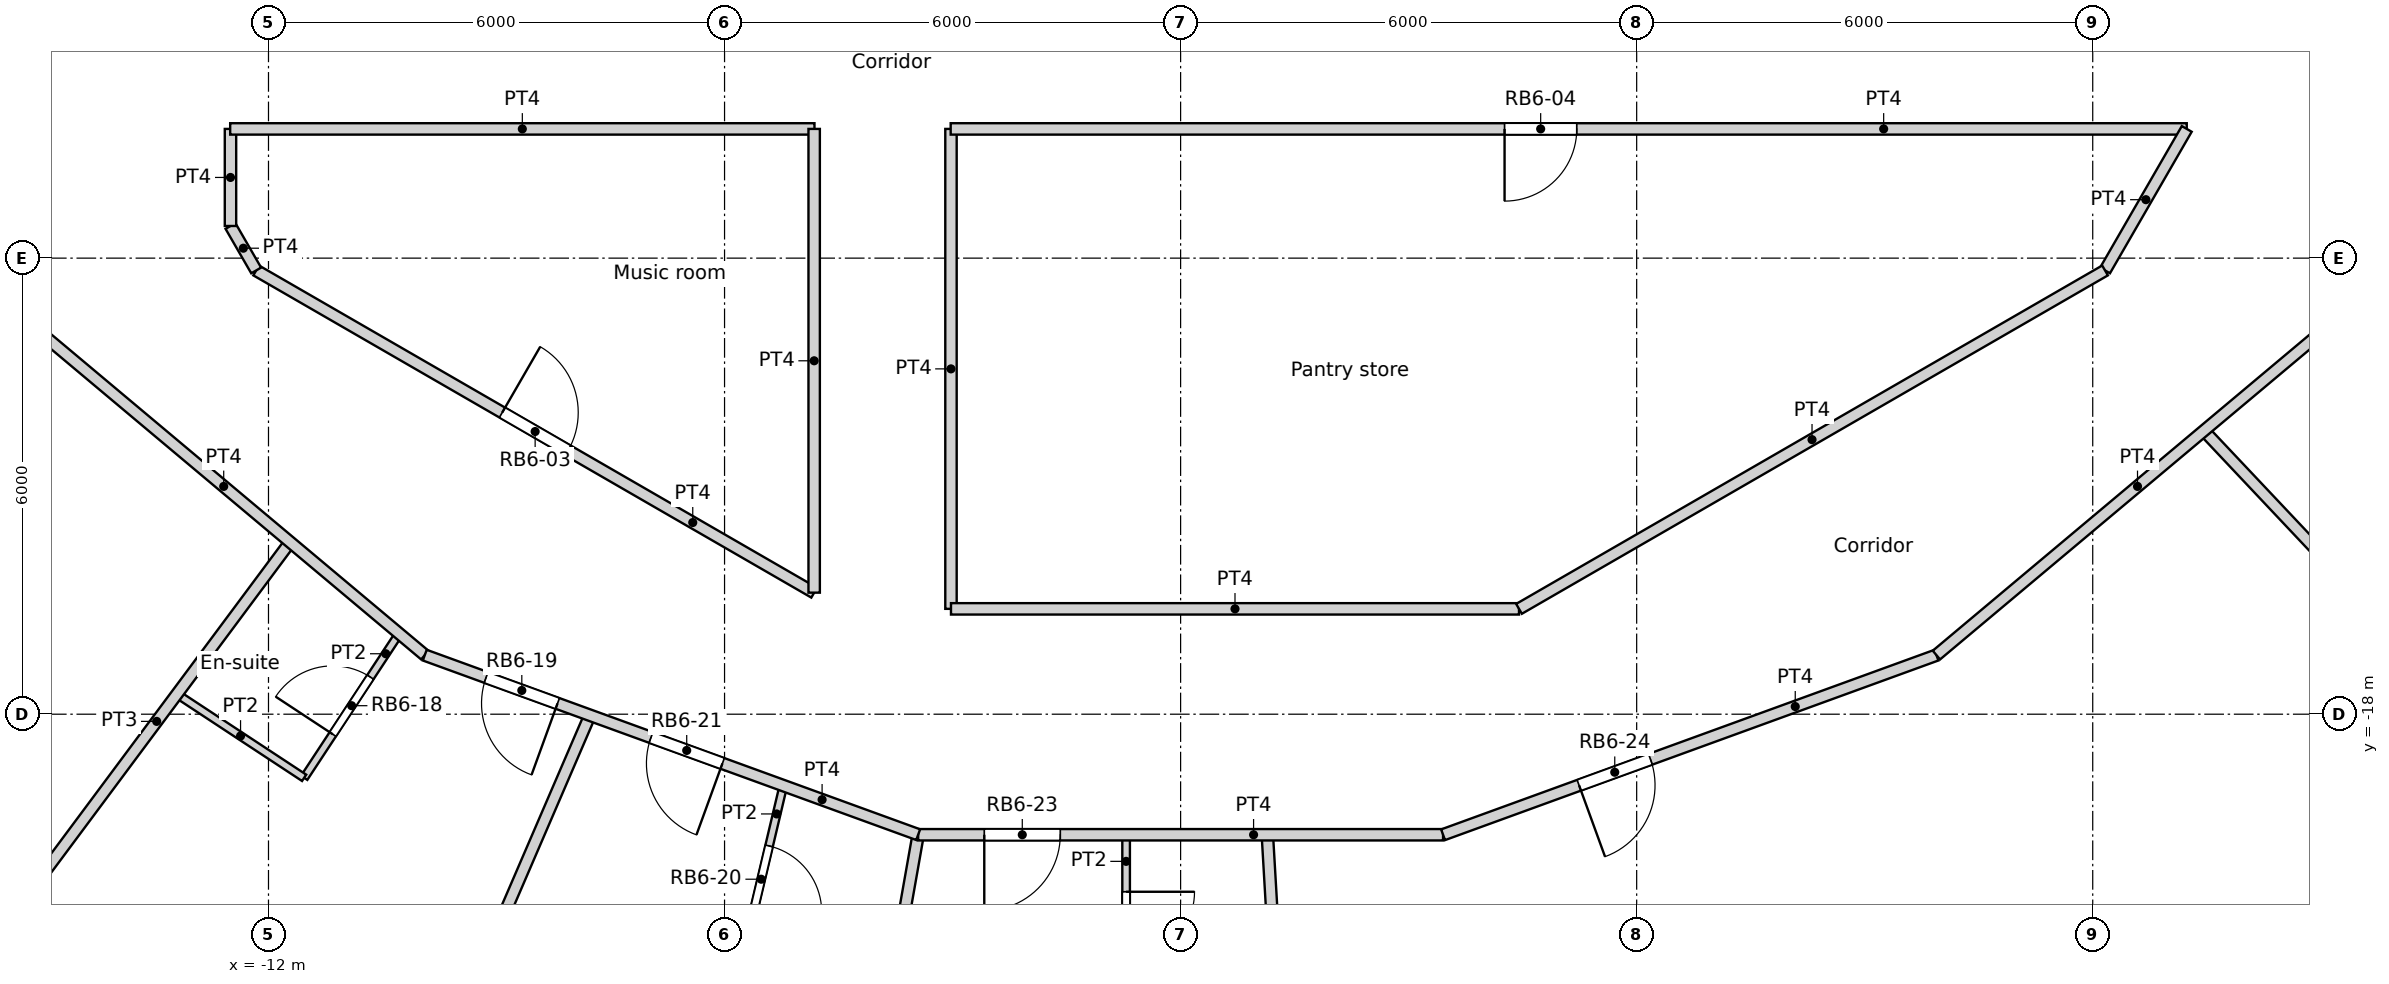
"""IFC4 building model, lengths in metres.
Left out: names, types, materials, properties, quantities, classifications, styles, units other than length and angle.
Written with IfcOpenShell. Run it as: python <this file> out.ifc"""

import sys

from ifc_helpers import new_model, si_unit, direction, frame, frame_2d, origin, origin_2d, place, context, subcontext, project, spatial, rectangle, circle, extrude, element, fill, save


model = new_model("IFC4")
c1 = context("Model", 3, precision=1e-05, world=origin(), true_north=direction((0.0, 1.0)))
c2 = subcontext(c1, "Body", "Model", "MODEL_VIEW")
j1 = project(units=[si_unit("LENGTHUNIT", "METRE"), si_unit("PLANEANGLEUNIT", "RADIAN")], contexts=[c1])
p1 = place(None, origin())
s1 = spatial("IfcSite", under=j1, at=p1, CompositionType="ELEMENT")
p2 = place(p1, origin())
s2 = spatial("IfcBuilding", under=s1, at=p2, CompositionType="ELEMENT")
p3 = place(p2, frame((0.0, 0.0, 180.0)))
s3 = spatial("IfcBuildingStorey", under=s2, at=p3, CompositionType="ELEMENT", Elevation=180.0)
p4 = place(p3, frame((14.659, -19.69, 0.0), z_axis=(0.0, 0.0, 1.0), x_axis=(1.0, 0.0, 0.0)))
e1 = element("IfcColumn", 1, at=p4, inside=s3, PredefinedType="COLUMN", context=c2, shape_type="SweptSolid", body=[
    extrude(circle(Radius=0.6, at=origin_2d()), origin(), (0.0, 0.0, 1.0), 3.6),
])
for number, where, z_axis, x_axis in (
    (2, (-13.798, -12.802, 0.0), (0.0, 0.0, 1.0), (1.0, 0.0, 0.0)),
    (3, (-9.411, -16.301, 0.0), (0.0, 0.0, 1.0), (1.0, 0.0, 0.0)),
    (4, (-4.188, -18.35, 0.0), (0.0, 0.0, 1.0), (1.0, 0.0, 0.0)),
    (5, (1.406, -18.77, 0.0), (0.0, 0.0, 1.0), (1.0, 0.0, 0.0)),
    (6, (6.876, -17.521, 0.0), (0.0, 0.0, 1.0), (1.0, 0.0, 0.0)),
    (7, (11.735, -14.716, 0.0), (0.0, 0.0, 1.0), (1.0, 0.0, 0.0)),
):
    element("IfcColumn", number, at=place(p3, frame(where, z_axis=z_axis, x_axis=x_axis)), inside=s3, PredefinedType="COLUMN", context=c2, shape_type="SweptSolid", body=[
        extrude(circle(Radius=0.65, at=origin_2d()), origin(), (0.0, 0.0, 1.0), 3.6),
    ])
p5 = place(p3, frame((-15.639, -21.048, -0.3), z_axis=(0.0, 0.0, 1.0), x_axis=(0.835514416706, -0.549468524554, 0.0)))
e8 = element("IfcWall", 8, at=p5, inside=s3, PredefinedType="ELEMENTEDWALL", context=c2, shape_type="SweptSolid", body=[
    extrude(rectangle(XDim=3.0, YDim=1.45, at=frame_2d((1.5, 0.0))), origin(), (0.0, 0.0, 1.0), 3.6),
])
p6 = place(p5, frame((1.5, 0.0, 1.85)))
e9 = element("IfcOpeningElement", 9, at=p6, cuts=e8, PredefinedType="OPENING", context=c2, shape_type="SweptSolid", body=[
    extrude(circle(Radius=0.9, at=origin_2d()), frame((0.0, 0.735, 0.0), z_axis=(0.0, -1.0, 0.0), x_axis=(1.0, 0.0, 0.0)), (0.0, 0.0, 1.0), 1.47),
])
p7 = place(p3, frame((12.832, -22.206, 0.0), z_axis=(0.0, 0.0, 1.0), x_axis=(0.835508361394, 0.54947773207, 0.0)))
e10 = element("IfcWall", 10, at=p7, inside=s3, PredefinedType="SOLIDWALL", context=c2, shape_type="SweptSolid", body=[
    extrude(rectangle(XDim=2.973, YDim=0.3, at=frame_2d((1.486, 0.0))), origin(), (0.0, 0.0, 1.0), 3.3),
])
p8 = place(p7, frame((1.486, 0.0, 1.55)))
e11 = element("IfcOpeningElement", 11, at=p8, cuts=e10, PredefinedType="OPENING", context=c2, shape_type="SweptSolid", body=[
    extrude(circle(Radius=0.9, at=origin_2d()), frame((0.0, 0.16, 0.0), z_axis=(0.0, -1.0, 0.0), x_axis=(1.0, 0.0, 0.0)), (0.0, 0.0, 1.0), 0.32),
])
p9 = place(p3, frame((-12.504, -10.3, 0.0), z_axis=(0.0, 0.0, 1.0), x_axis=(1.0, 0.0, 0.0)))
e12 = element("IfcWall", 12, at=p9, inside=s3, PredefinedType="PARTITIONING", context=c2, shape_type="SweptSolid", body=[
    extrude(rectangle(XDim=7.687, YDim=0.15, at=frame_2d((3.844, 0.0))), origin(), (0.0, 0.0, 1.0), 3.3),
])
p10 = place(p3, frame((-3.025, -10.3, 0.0), z_axis=(0.0, 0.0, 1.0), x_axis=(1.0, 0.0, 0.0)))
e13 = element("IfcWall", 13, at=p10, inside=s3, PredefinedType="PARTITIONING", context=c2, shape_type="SweptSolid", body=[
    extrude(rectangle(XDim=16.262, YDim=0.15, at=frame_2d((8.131, 0.0))), origin(), (0.0, 0.0, 1.0), 3.3),
])
p11 = place(p10, frame((7.287, 0.0, 0.0)))
e14 = element("IfcOpeningElement", 14, at=p11, cuts=e13, PredefinedType="OPENING", context=c2, shape_type="SweptSolid", body=[
    extrude(rectangle(XDim=0.95, YDim=2.1, at=frame_2d((0.475, 1.05))), frame((0.0, 0.075, 0.0), z_axis=(0.0, -1.0, 0.0), x_axis=(1.0, 0.0, 0.0)), (0.0, 0.0, 1.0), 0.15),
])
p12 = place(p3, frame((12.162, -12.162, 0.0), z_axis=(0.0, 0.0, 1.0), x_axis=(0.499961633463, 0.866047553582, 0.0)))
e15 = element("IfcWall", 15, at=p12, inside=s3, PredefinedType="PARTITIONING", context=c2, shape_type="SweptSolid", body=[
    extrude(rectangle(XDim=2.15, YDim=0.15, at=frame_2d((1.075, 0.0))), origin(), (0.0, 0.0, 1.0), 3.3),
])
p13 = place(p3, frame((9.943, -17.222, 0.0), z_axis=(0.0, 0.0, 1.0), x_axis=(0.766192104565, 0.642611592567, 0.0)))
e16 = element("IfcWall", 16, at=p13, inside=s3, PredefinedType="PARTITIONING", context=c2, shape_type="SweptSolid", body=[
    extrude(rectangle(XDim=6.906, YDim=0.15, at=frame_2d((3.453, 0.0))), origin(), (0.0, 0.0, 1.0), 3.3),
])
p14 = place(p3, frame((-12.5, -11.577, 0.0), z_axis=(0.0, 0.0, 1.0), x_axis=(0.0, 1.0, 0.0)))
e17 = element("IfcWall", 17, at=p14, inside=s3, PredefinedType="PARTITIONING", context=c2, shape_type="SweptSolid", body=[
    extrude(rectangle(XDim=1.277, YDim=0.15, at=frame_2d((0.638, 0.0))), origin(), (0.0, 0.0, 1.0), 3.3),
])
p15 = place(p3, frame((-12.5, -11.577, 0.0), z_axis=(0.0, 0.0, 1.0), x_axis=(0.500024767483, -0.866011103799, 0.0)))
e18 = element("IfcWall", 18, at=p15, inside=s3, PredefinedType="PARTITIONING", context=c2, shape_type="SweptSolid", body=[
    extrude(rectangle(XDim=0.676, YDim=0.15, at=frame_2d((0.338, 0.0))), origin(), (0.0, 0.0, 1.0), 3.3),
])
p16 = place(p3, frame((-15.235, -12.784, 0.0), z_axis=(0.0, 0.0, 1.0), x_axis=(0.766192104565, -0.642611592567, 0.0)))
e19 = element("IfcWall", 19, at=p16, inside=s3, PredefinedType="PARTITIONING", context=c2, shape_type="SweptSolid", body=[
    extrude(rectangle(XDim=6.906, YDim=0.15, at=frame_2d((3.453, 0.0))), origin(), (0.0, 0.0, 1.0), 3.3),
])
p17 = place(p3, frame((-12.162, -12.162, 0.0), z_axis=(0.0, 0.0, 1.0), x_axis=(0.866004766557, -0.500035743023, 0.0)))
e20 = element("IfcWall", 20, at=p17, inside=s3, PredefinedType="PARTITIONING", context=c2, shape_type="SweptSolid", body=[
    extrude(rectangle(XDim=8.477, YDim=0.15, at=frame_2d((4.239, 0.0))), origin(), (0.0, 0.0, 1.0), 3.3),
])
p18 = place(p17, frame((3.738, 0.0, 0.0)))
e21 = element("IfcOpeningElement", 21, at=p18, cuts=e20, PredefinedType="OPENING", context=c2, shape_type="SweptSolid", body=[
    extrude(rectangle(XDim=1.0, YDim=2.04, at=frame_2d((0.5, 1.02))), frame((0.0, 0.075, 0.0), z_axis=(0.0, -1.0, 0.0), x_axis=(1.0, 0.0, 0.0)), (0.0, 0.0, 1.0), 0.15),
])
p19 = place(p3, frame((-4.821, -16.401, 0.0), z_axis=(0.0, 0.0, 1.0), x_axis=(0.0, 1.0, 0.0)))
e22 = element("IfcWall", 22, at=p19, inside=s3, PredefinedType="PARTITIONING", context=c2, shape_type="SweptSolid", body=[
    extrude(rectangle(XDim=6.101, YDim=0.15, at=frame_2d((3.05, 0.0))), origin(), (0.0, 0.0, 1.0), 3.3),
])
p20 = place(p3, frame((-3.021, -16.614, 0.0), z_axis=(0.0, 0.0, 1.0), x_axis=(0.0, 1.0, 0.0)))
e23 = element("IfcWall", 23, at=p20, inside=s3, PredefinedType="PARTITIONING", context=c2, shape_type="SweptSolid", body=[
    extrude(rectangle(XDim=6.314, YDim=0.15, at=frame_2d((3.157, 0.0))), origin(), (0.0, 0.0, 1.0), 3.3),
])
p21 = place(p3, frame((-3.021, -16.614, 0.0), z_axis=(0.0, 0.0, 1.0), x_axis=(1.0, 0.0, 0.0)))
e24 = element("IfcWall", 24, at=p21, inside=s3, PredefinedType="PARTITIONING", context=c2, shape_type="SweptSolid", body=[
    extrude(rectangle(XDim=7.473, YDim=0.15, at=frame_2d((3.736, 0.0))), origin(), (0.0, 0.0, 1.0), 3.3),
])
p22 = place(p3, frame((4.452, -16.614, 0.0), z_axis=(0.0, 0.0, 1.0), x_axis=(0.866005203721, 0.500034985904, 0.0)))
e25 = element("IfcWall", 25, at=p22, inside=s3, PredefinedType="PARTITIONING", context=c2, shape_type="SweptSolid", body=[
    extrude(rectangle(XDim=8.903, YDim=0.15, at=frame_2d((4.452, 0.0))), origin(), (0.0, 0.0, 1.0), 3.3),
])
p23 = place(p3, frame((-9.944, -17.223, 0.0), z_axis=(0.0, 0.0, 1.0), x_axis=(0.939737689664, -0.341896292208, 0.0)))
e26 = element("IfcWall", 26, at=p23, inside=s3, PredefinedType="PARTITIONING", context=c2, shape_type="SweptSolid", body=[
    extrude(rectangle(XDim=6.908, YDim=0.15, at=frame_2d((3.454, 0.0))), origin(), (0.0, 0.0, 1.0), 3.3),
])
p24 = place(p23, frame((0.859, 0.0, 0.0)))
e27 = element("IfcOpeningElement", 27, at=p24, cuts=e26, PredefinedType="OPENING", context=c2, shape_type="SweptSolid", body=[
    extrude(rectangle(XDim=1.0, YDim=2.1, at=frame_2d((0.5, 1.05))), frame((0.0, 0.075, 0.0), z_axis=(0.0, -1.0, 0.0), x_axis=(1.0, 0.0, 0.0)), (0.0, 0.0, 1.0), 0.15),
])
p25 = place(p23, frame((3.167, 0.0, 0.0)))
e28 = element("IfcOpeningElement", 28, at=p25, cuts=e26, PredefinedType="OPENING", context=c2, shape_type="SweptSolid", body=[
    extrude(rectangle(XDim=1.0, YDim=2.1, at=frame_2d((0.5, 1.05))), frame((0.0, 0.075, 0.0), z_axis=(0.0, -1.0, 0.0), x_axis=(1.0, 0.0, 0.0)), (0.0, 0.0, 1.0), 0.15),
])
p26 = place(p3, frame((-3.453, -19.586, 0.0), z_axis=(0.0, 0.0, 1.0), x_axis=(1.0, 0.0, 0.0)))
e29 = element("IfcWall", 29, at=p26, inside=s3, PredefinedType="PARTITIONING", context=c2, shape_type="SweptSolid", body=[
    extrude(rectangle(XDim=6.906, YDim=0.15, at=frame_2d((3.453, 0.0))), origin(), (0.0, 0.0, 1.0), 3.3),
])
p27 = place(p26, frame((0.87, 0.0, 0.0)))
e30 = element("IfcOpeningElement", 30, at=p27, cuts=e29, PredefinedType="OPENING", context=c2, shape_type="SweptSolid", body=[
    extrude(rectangle(XDim=1.0, YDim=2.1, at=frame_2d((0.5, 1.05))), frame((0.0, 0.075, 0.0), z_axis=(0.0, -1.0, 0.0), x_axis=(1.0, 0.0, 0.0)), (0.0, 0.0, 1.0), 0.15),
])
p28 = place(p3, frame((3.453, -19.586, 0.0), z_axis=(0.0, 0.0, 1.0), x_axis=(0.939672634566, 0.342075050021, 0.0)))
e31 = element("IfcWall", 31, at=p28, inside=s3, PredefinedType="PARTITIONING", context=c2, shape_type="SweptSolid", body=[
    extrude(rectangle(XDim=6.908, YDim=0.15, at=frame_2d((3.454, 0.0))), origin(), (0.0, 0.0, 1.0), 3.3),
])
p29 = place(p28, frame((1.904, 0.0, 0.0)))
e32 = element("IfcOpeningElement", 32, at=p29, cuts=e31, PredefinedType="OPENING", context=c2, shape_type="SweptSolid", body=[
    extrude(rectangle(XDim=1.0, YDim=2.04, at=frame_2d((0.5, 1.02))), frame((0.0, 0.075, 0.0), z_axis=(0.0, -1.0, 0.0), x_axis=(1.0, 0.0, 0.0)), (0.0, 0.0, 1.0), 0.15),
])
p30 = place(p3, frame((-15.226, -20.452, 0.0), z_axis=(0.0, 0.0, 1.0), x_axis=(0.597131981171, 0.802143002876, 0.0)))
e33 = element("IfcWall", 33, at=p30, inside=s3, PredefinedType="PARTITIONING", context=c2, shape_type="SweptSolid", body=[
    extrude(rectangle(XDim=5.878, YDim=0.15, at=frame_2d((2.939, 0.0))), origin(), (0.0, 0.0, 1.0), 3.3),
])
p31 = place(p3, frame((-13.204, -17.736, 0.0), z_axis=(0.0, 0.0, 1.0), x_axis=(0.835392041163, -0.549654562032, 0.0)))
e34 = element("IfcWall", 34, at=p31, inside=s3, PredefinedType="PARTITIONING", context=c2, shape_type="SweptSolid", body=[
    extrude(rectangle(XDim=2.003, YDim=0.1, at=frame_2d((1.001, 0.0))), origin(), (0.0, 0.0, 1.0), 3.3),
])
p32 = place(p3, frame((-11.531, -18.837, 0.0), z_axis=(0.0, 0.0, 1.0), x_axis=(0.549730960803, 0.83534176882, 0.0)))
e35 = element("IfcWall", 35, at=p32, inside=s3, PredefinedType="PARTITIONING", context=c2, shape_type="SweptSolid", body=[
    extrude(rectangle(XDim=2.272, YDim=0.1, at=frame_2d((1.136, 0.0))), origin(), (0.0, 0.0, 1.0), 3.3),
])
p33 = place(p32, frame((0.686, 0.0, 0.0)))
e36 = element("IfcOpeningElement", 36, at=p33, cuts=e35, PredefinedType="OPENING", context=c2, shape_type="SweptSolid", body=[
    extrude(rectangle(XDim=0.9, YDim=2.04, at=frame_2d((0.45, 1.02))), frame((0.0, 0.05, 0.0), z_axis=(0.0, -1.0, 0.0), x_axis=(1.0, 0.0, 0.0)), (0.0, 0.0, 1.0), 0.1),
])
p34 = place(p3, frame((-10.099, -23.412, 0.0), z_axis=(0.0, 0.0, 1.0), x_axis=(0.39601833725, 0.918242602236, 0.0)))
e37 = element("IfcWall", 37, at=p34, inside=s3, PredefinedType="PARTITIONING", context=c2, shape_type="SweptSolid", body=[
    extrude(rectangle(XDim=5.879, YDim=0.15, at=frame_2d((2.939, 0.0))), origin(), (0.0, 0.0, 1.0), 3.3),
])
p35 = place(p3, frame((-5.809, -21.401, 0.0), z_axis=(0.0, 0.0, 1.0), x_axis=(0.230524114202, 0.97306661271, 0.0)))
e38 = element("IfcWall", 38, at=p35, inside=s3, PredefinedType="PARTITIONING", context=c2, shape_type="SweptSolid", body=[
    extrude(rectangle(XDim=2.529, YDim=0.1, at=frame_2d((1.265, 0.0))), origin(), (0.0, 0.0, 1.0), 3.3),
])
p36 = place(p35, frame((0.814, 0.0, 0.0)))
e39 = element("IfcOpeningElement", 39, at=p36, cuts=e38, PredefinedType="OPENING", context=c2, shape_type="SweptSolid", body=[
    extrude(rectangle(XDim=0.9, YDim=2.04, at=frame_2d((0.45, 1.02))), frame((0.0, 0.05, 0.0), z_axis=(0.0, -1.0, 0.0), x_axis=(1.0, 0.0, 0.0)), (0.0, 0.0, 1.0), 0.1),
])
p37 = place(p3, frame((-4.428, -25.11, 0.0), z_axis=(0.0, 0.0, 1.0), x_axis=(0.17382754149, 0.984776109489, 0.0)))
e40 = element("IfcWall", 40, at=p37, inside=s3, PredefinedType="PARTITIONING", context=c2, shape_type="SweptSolid", body=[
    extrude(rectangle(XDim=5.61, YDim=0.15, at=frame_2d((2.805, 0.0))), origin(), (0.0, 0.0, 1.0), 3.3),
])
p38 = place(p3, frame((-0.717, -21.986, 0.0), z_axis=(0.0, 0.0, 1.0), x_axis=(0.0, 1.0, 0.0)))
e41 = element("IfcWall", 41, at=p38, inside=s3, PredefinedType="PARTITIONING", context=c2, shape_type="SweptSolid", body=[
    extrude(rectangle(XDim=2.4, YDim=0.1, at=frame_2d((1.2, 0.0))), origin(), (0.0, 0.0, 1.0), 3.3),
])
p39 = place(p38, frame((0.75, 0.0, 0.0)))
e42 = element("IfcOpeningElement", 42, at=p39, cuts=e41, PredefinedType="OPENING", context=c2, shape_type="SweptSolid", body=[
    extrude(rectangle(XDim=0.9, YDim=2.04, at=frame_2d((0.45, 1.02))), frame((0.0, 0.05, 0.0), z_axis=(0.0, -1.0, 0.0), x_axis=(1.0, 0.0, 0.0)), (0.0, 0.0, 1.0), 0.1),
])
p40 = place(p3, frame((1.141, -19.586, 0.0), z_axis=(0.0, 0.0, 1.0), x_axis=(0.058147412668, -0.998308007781, 0.0)))
e43 = element("IfcWall", 43, at=p40, inside=s3, PredefinedType="PARTITIONING", context=c2, shape_type="SweptSolid", body=[
    extrude(rectangle(XDim=5.878, YDim=0.15, at=frame_2d((2.939, 0.0))), origin(), (0.0, 0.0, 1.0), 3.3),
])
p41 = place(p3, frame((13.463, -14.27, 0.0), z_axis=(0.0, 0.0, 1.0), x_axis=(0.6862502776, -0.72736549031, 0.0)))
e44 = element("IfcWall", 44, at=p41, inside=s3, PredefinedType="PARTITIONING", context=c2, shape_type="SweptSolid", body=[
    extrude(rectangle(XDim=5.879, YDim=0.15, at=frame_2d((2.939, 0.0))), origin(), (0.0, 0.0, 1.0), 3.3),
])
p42 = place(p18, origin())
e45 = element("IfcDoor", 45, at=p42, inside=s3, OperationType="SINGLE_SWING_LEFT", PredefinedType="DOOR", context=c2, shape_type="SweptSolid", body=[
    extrude(rectangle(XDim=1.0, YDim=2.04, at=frame_2d((0.5, 1.02))), frame((0.0, 0.025, 0.0), z_axis=(0.0, -1.0, 0.0), x_axis=(1.0, 0.0, 0.0)), (0.0, 0.0, 1.0), 0.05),
])
fill(e21, e45)
p43 = place(p11, origin())
e46 = element("IfcDoor", 46, at=p43, inside=s3, OperationType="SINGLE_SWING_RIGHT", PredefinedType="DOOR", context=c2, shape_type="SweptSolid", body=[
    extrude(rectangle(XDim=0.95, YDim=2.1, at=frame_2d((0.475, 1.05))), frame((0.0, 0.025, 0.0), z_axis=(0.0, -1.0, 0.0), x_axis=(1.0, 0.0, 0.0)), (0.0, 0.0, 1.0), 0.05),
])
fill(e14, e46)
p44 = place(p33, origin())
e47 = element("IfcDoor", 47, at=p44, inside=s3, OperationType="SINGLE_SWING_LEFT", PredefinedType="DOOR", context=c2, shape_type="SweptSolid", body=[
    extrude(rectangle(XDim=0.9, YDim=2.04, at=frame_2d((0.45, 1.02))), frame((0.0, 0.025, 0.0), z_axis=(0.0, -1.0, 0.0), x_axis=(1.0, 0.0, 0.0)), (0.0, 0.0, 1.0), 0.05),
])
fill(e36, e47)
p45 = place(p24, origin())
e48 = element("IfcDoor", 48, at=p45, inside=s3, OperationType="SINGLE_SWING_LEFT", PredefinedType="DOOR", context=c2, shape_type="SweptSolid", body=[
    extrude(rectangle(XDim=1.0, YDim=2.1, at=frame_2d((0.5, 1.05))), frame((0.0, 0.025, 0.0), z_axis=(0.0, -1.0, 0.0), x_axis=(1.0, 0.0, 0.0)), (0.0, 0.0, 1.0), 0.05),
])
fill(e27, e48)
p46 = place(p36, origin())
e49 = element("IfcDoor", 49, at=p46, inside=s3, OperationType="SINGLE_SWING_RIGHT", PredefinedType="DOOR", context=c2, shape_type="SweptSolid", body=[
    extrude(rectangle(XDim=0.9, YDim=2.04, at=frame_2d((0.45, 1.02))), frame((0.0, 0.025, 0.0), z_axis=(0.0, -1.0, 0.0), x_axis=(1.0, 0.0, 0.0)), (0.0, 0.0, 1.0), 0.05),
])
fill(e39, e49)
p47 = place(p25, origin())
e50 = element("IfcDoor", 50, at=p47, inside=s3, OperationType="SINGLE_SWING_LEFT", PredefinedType="DOOR", context=c2, shape_type="SweptSolid", body=[
    extrude(rectangle(XDim=1.0, YDim=2.1, at=frame_2d((0.5, 1.05))), frame((0.0, 0.025, 0.0), z_axis=(0.0, -1.0, 0.0), x_axis=(1.0, 0.0, 0.0)), (0.0, 0.0, 1.0), 0.05),
])
fill(e28, e50)
p48 = place(p39, origin())
e51 = element("IfcDoor", 51, at=p48, inside=s3, OperationType="SINGLE_SWING_LEFT", PredefinedType="DOOR", context=c2, shape_type="SweptSolid", body=[
    extrude(rectangle(XDim=0.9, YDim=2.04, at=frame_2d((0.45, 1.02))), frame((0.0, 0.025, 0.0), z_axis=(0.0, -1.0, 0.0), x_axis=(1.0, 0.0, 0.0)), (0.0, 0.0, 1.0), 0.05),
])
fill(e42, e51)
p49 = place(p27, origin())
e52 = element("IfcDoor", 52, at=p49, inside=s3, OperationType="SINGLE_SWING_RIGHT", PredefinedType="DOOR", context=c2, shape_type="SweptSolid", body=[
    extrude(rectangle(XDim=1.0, YDim=2.1, at=frame_2d((0.5, 1.05))), frame((0.0, 0.025, 0.0), z_axis=(0.0, -1.0, 0.0), x_axis=(1.0, 0.0, 0.0)), (0.0, 0.0, 1.0), 0.05),
])
fill(e30, e52)
p50 = place(p29, origin())
e53 = element("IfcDoor", 53, at=p50, inside=s3, OperationType="SINGLE_SWING_RIGHT", PredefinedType="DOOR", context=c2, shape_type="SweptSolid", body=[
    extrude(rectangle(XDim=1.0, YDim=2.04, at=frame_2d((0.5, 1.02))), frame((0.0, 0.025, 0.0), z_axis=(0.0, -1.0, 0.0), x_axis=(1.0, 0.0, 0.0)), (0.0, 0.0, 1.0), 0.05),
])
fill(e32, e53)
save(model, sys.argv[1])
